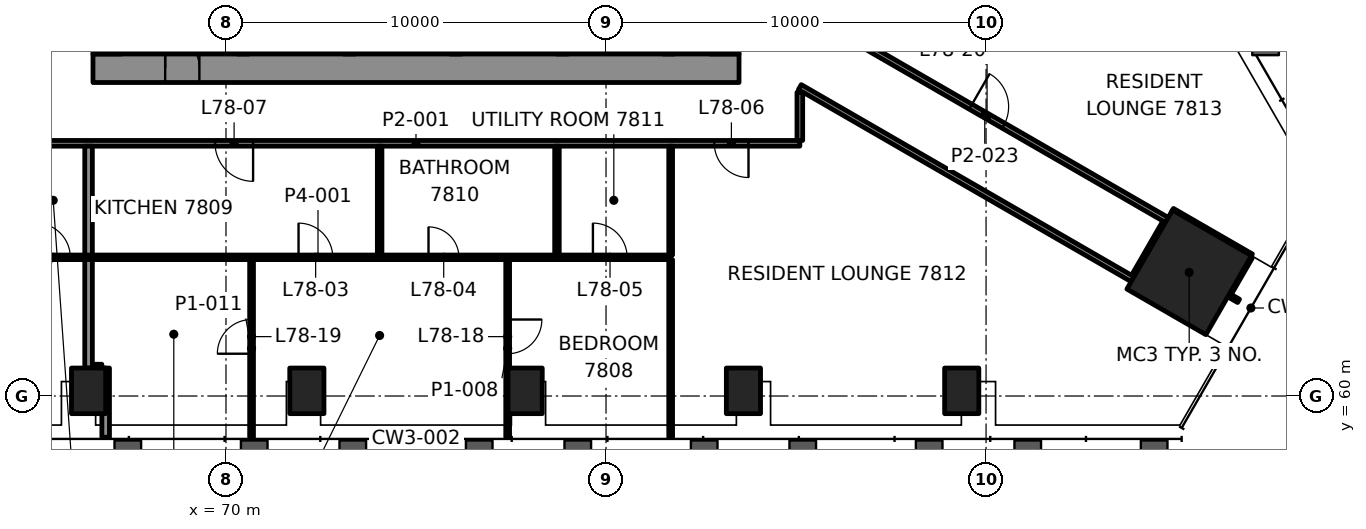
"""IFC4 building model, lengths in metres.
Left out: names, types, materials, properties, quantities, classifications, styles, units other than length and angle.
Written with IfcOpenShell. Run it as: python <this file> out.ifc"""

import sys

from ifc_helpers import new_model, si_unit, direction, frame, frame_2d, origin, origin_2d, place, context, subcontext, project, spatial, rectangle, hollow_rectangle, extrude, element, fill, save


model = new_model("IFC4")
c1 = context("Model", 3, precision=1e-05, world=origin(), true_north=direction((0.0, 1.0)))
c2 = subcontext(c1, "Body", "Model", "MODEL_VIEW")
j1 = project(units=[si_unit("LENGTHUNIT", "METRE"), si_unit("PLANEANGLEUNIT", "RADIAN")], contexts=[c1])
p1 = place(None, origin())
s1 = spatial("IfcSite", under=j1, at=p1, CompositionType="ELEMENT")
p2 = place(p1, origin())
s2 = spatial("IfcBuilding", under=s1, at=p2, CompositionType="ELEMENT")
p3 = place(p2, frame((0.0, 0.0, 319.6)))
s3 = spatial("IfcBuildingStorey", under=s2, at=p3, CompositionType="ELEMENT", Elevation=319.6)
p4 = place(p3, frame((95.345, 63.254, 0.0), z_axis=(0.0, 0.0, 1.0), x_axis=(0.5, 0.866025403784, 0.0)))
e1 = element("IfcColumn", 1, at=p4, inside=s3, PredefinedType="COLUMN", context=c2, shape_type="SweptSolid", body=[
    extrude(rectangle(XDim=2.4, YDim=2.4, at=origin_2d()), origin(), (0.0, 0.0, 1.0), 3.5),
])
for number, where, z_axis, x_axis in (
    (2, (66.384, 60.136, -0.0), (0.0, 0.0, 1.0), (1.0, 0.0, 0.0)),
    (3, (72.128, 60.136, -0.0), (0.0, 0.0, 1.0), (1.0, 0.0, 0.0)),
    (4, (77.872, 60.136, -0.0), (0.0, 0.0, 1.0), (1.0, 0.0, 0.0)),
    (5, (83.616, 60.136, -0.0), (0.0, 0.0, 1.0), (1.0, 0.0, 0.0)),
    (6, (89.36, 60.136, -0.0), (0.0, 0.0, 1.0), (1.0, 0.0, 0.0)),
):
    element("IfcColumn", number, at=place(p3, frame(where, z_axis=z_axis, x_axis=x_axis)), inside=s3, PredefinedType="COLUMN", context=c2, shape_type="SweptSolid", body=[
        extrude(hollow_rectangle(XDim=0.9, YDim=1.2, WallThickness=0.06, at=origin_2d()), origin(), (0.0, 0.0, 1.0), 3.5),
    ])
p5 = place(p3, frame((66.5, 68.625, 0.0), z_axis=(0.0, 0.0, 1.0), x_axis=(1.0, 0.0, 0.0)))
e7 = element("IfcWall", 7, at=p5, inside=s3, PredefinedType="SHEAR", context=c2, shape_type="SweptSolid", body=[
    extrude(rectangle(XDim=17.0, YDim=0.75, at=frame_2d((8.5, 0.0))), origin(), (0.0, 0.0, 1.0), 3.3),
])
p6 = place(p5, frame((1.9, 0.0, 0.0)))
e8 = element("IfcOpeningElement", 8, at=p6, cuts=e7, PredefinedType="OPENING", context=c2, shape_type="SweptSolid", body=[
    extrude(rectangle(XDim=0.9, YDim=2.1, at=frame_2d((0.45, 1.05))), frame((0.0, 0.385, 0.0), z_axis=(0.0, -1.0, 0.0), x_axis=(1.0, 0.0, 0.0)), (0.0, 0.0, 1.0), 0.77),
])
p7 = place(p3, frame((66.875, 69.0, 0.0), z_axis=(0.0, 0.0, 1.0), x_axis=(0.0, 1.0, 0.0)))
e9 = element("IfcWall", 9, at=p7, inside=s3, PredefinedType="SHEAR", context=c2, shape_type="SweptSolid", body=[
    extrude(rectangle(XDim=12.0, YDim=0.75, at=frame_2d((6.0, 0.0))), origin(), (0.0, 0.0, 1.0), 3.3),
])
p8 = place(p7, frame((3.7, 0.0, 0.0)))
e10 = element("IfcOpeningElement", 10, at=p8, cuts=e9, PredefinedType="OPENING", context=c2, shape_type="SweptSolid", body=[
    extrude(rectangle(XDim=1.2, YDim=2.1, at=frame_2d((0.6, 1.05))), frame((0.0, 0.385, 0.0), z_axis=(0.0, -1.0, 0.0), x_axis=(1.0, 0.0, 0.0)), (0.0, 0.0, 1.0), 0.77),
])
p9 = place(p3, frame((83.125, 69.0, 0.0), z_axis=(0.0, 0.0, 1.0), x_axis=(0.0, 1.0, 0.0)))
e11 = element("IfcWall", 11, at=p9, inside=s3, PredefinedType="SHEAR", context=c2, shape_type="SweptSolid", body=[
    extrude(rectangle(XDim=12.0, YDim=0.75, at=frame_2d((6.0, 0.0))), origin(), (0.0, 0.0, 1.0), 3.3),
])
p10 = place(p9, frame((3.4, 0.0, 0.0)))
e12 = element("IfcOpeningElement", 12, at=p10, cuts=e11, PredefinedType="OPENING", context=c2, shape_type="SweptSolid", body=[
    extrude(rectangle(XDim=1.8, YDim=2.1, at=frame_2d((0.9, 1.05))), frame((0.0, 0.385, 0.0), z_axis=(0.0, -1.0, 0.0), x_axis=(1.0, 0.0, 0.0)), (0.0, 0.0, 1.0), 0.77),
])
for number, where, z_axis, x_axis in (
    (13, (70.45, 69.0, 0.0), (0.0, 0.0, 1.0), (0.0, 1.0, 0.0)),
    (14, (73.25, 69.0, 0.0), (0.0, 0.0, 1.0), (0.0, 1.0, 0.0)),
    (15, (76.05, 69.0, 0.0), (0.0, 0.0, 1.0), (0.0, 1.0, 0.0)),
    (16, (78.85, 69.0, 0.0), (0.0, 0.0, 1.0), (0.0, 1.0, 0.0)),
    (17, (81.65, 69.0, 0.0), (0.0, 0.0, 1.0), (0.0, 1.0, 0.0)),
):
    element("IfcWall", number, at=place(p3, frame(where, z_axis=z_axis, x_axis=x_axis)), inside=s3, PredefinedType="SHEAR", context=c2, shape_type="SweptSolid", body=[
        extrude(rectangle(XDim=2.6, YDim=0.3, at=frame_2d((1.3, 0.0))), origin(), (0.0, 0.0, 1.0), 3.3),
    ])
p11 = place(p3, frame((66.484, 60.736, 0.0), z_axis=(0.0, 0.0, 1.0), x_axis=(1.0, 0.0, 0.0)))
e18 = element("IfcWall", 18, at=p11, inside=s3, PredefinedType="PARTITIONING", context=c2, shape_type="SweptSolid", body=[
    extrude(rectangle(XDim=0.25, YDim=0.2, at=frame_2d((0.125, 0.0))), origin(), (0.0, 0.0, 1.0), 2.7),
])
p12 = place(p3, frame((63.141, 63.65, 0.0), z_axis=(0.0, 0.0, 1.0), x_axis=(1.0, 0.0, 0.0)))
e19 = element("IfcWall", 19, at=p12, inside=s3, PredefinedType="PARTITIONING", context=c2, shape_type="SweptSolid", body=[
    extrude(rectangle(XDim=18.56, YDim=0.12, at=frame_2d((9.28, 0.0))), origin(), (0.0, 0.0, 1.0), 2.7),
])
p13 = place(p12, frame((0.391, 0.0, 0.0)))
e20 = element("IfcOpeningElement", 20, at=p13, cuts=e19, PredefinedType="OPENING", context=c2, shape_type="SweptSolid", body=[
    extrude(rectangle(XDim=0.8, YDim=2.1, at=frame_2d((0.4, 1.05))), frame((0.0, 0.07, 0.0), z_axis=(0.0, -1.0, 0.0), x_axis=(1.0, 0.0, 0.0)), (0.0, 0.0, 1.0), 0.14),
])
p14 = place(p12, frame((1.862, 0.0, 0.0)))
e21 = element("IfcOpeningElement", 21, at=p14, cuts=e19, PredefinedType="OPENING", context=c2, shape_type="SweptSolid", body=[
    extrude(rectangle(XDim=0.9, YDim=2.1, at=frame_2d((0.45, 1.05))), frame((0.0, 0.07, 0.0), z_axis=(0.0, -1.0, 0.0), x_axis=(1.0, 0.0, 0.0)), (0.0, 0.0, 1.0), 0.14),
])
p15 = place(p12, frame((8.768, 0.0, 0.0)))
e22 = element("IfcOpeningElement", 22, at=p15, cuts=e19, PredefinedType="OPENING", context=c2, shape_type="SweptSolid", body=[
    extrude(rectangle(XDim=0.9, YDim=2.1, at=frame_2d((0.45, 1.05))), frame((0.0, 0.07, 0.0), z_axis=(0.0, -1.0, 0.0), x_axis=(1.0, 0.0, 0.0)), (0.0, 0.0, 1.0), 0.14),
])
p16 = place(p12, frame((12.188, 0.0, 0.0)))
e23 = element("IfcOpeningElement", 23, at=p16, cuts=e19, PredefinedType="OPENING", context=c2, shape_type="SweptSolid", body=[
    extrude(rectangle(XDim=0.8, YDim=2.1, at=frame_2d((0.4, 1.05))), frame((0.0, 0.07, 0.0), z_axis=(0.0, -1.0, 0.0), x_axis=(1.0, 0.0, 0.0)), (0.0, 0.0, 1.0), 0.14),
])
p17 = place(p12, frame((16.514, 0.0, 0.0)))
e24 = element("IfcOpeningElement", 24, at=p17, cuts=e19, PredefinedType="OPENING", context=c2, shape_type="SweptSolid", body=[
    extrude(rectangle(XDim=0.9, YDim=2.1, at=frame_2d((0.45, 1.05))), frame((0.0, 0.07, 0.0), z_axis=(0.0, -1.0, 0.0), x_axis=(1.0, 0.0, 0.0)), (0.0, 0.0, 1.0), 0.14),
])
p18 = place(p3, frame((85.099, 66.65, 0.0), z_axis=(0.0, 0.0, 1.0), x_axis=(-1.0, 0.0, 0.0)))
e25 = element("IfcWall", 25, at=p18, inside=s3, PredefinedType="PARTITIONING", context=c2, shape_type="SweptSolid", body=[
    extrude(rectangle(XDim=20.199, YDim=0.15, at=frame_2d((10.1, 0.0))), origin(), (0.0, 0.0, 1.0), 2.7),
])
p19 = place(p18, frame((1.351, 0.0, 0.0)))
e26 = element("IfcOpeningElement", 26, at=p19, cuts=e25, PredefinedType="OPENING", context=c2, shape_type="SweptSolid", body=[
    extrude(rectangle(XDim=0.9, YDim=2.1, at=frame_2d((0.45, 1.05))), frame((0.0, 0.085, 0.0), z_axis=(0.0, -1.0, 0.0), x_axis=(1.0, 0.0, 0.0)), (0.0, 0.0, 1.0), 0.17),
])
p20 = place(p18, frame((14.386, 0.0, 0.0)))
e27 = element("IfcOpeningElement", 27, at=p20, cuts=e25, PredefinedType="OPENING", context=c2, shape_type="SweptSolid", body=[
    extrude(rectangle(XDim=1.0, YDim=2.1, at=frame_2d((0.5, 1.05))), frame((0.0, 0.085, 0.0), z_axis=(0.0, -1.0, 0.0), x_axis=(1.0, 0.0, 0.0)), (0.0, 0.0, 1.0), 0.17),
])
p21 = place(p3, frame((96.384, 62.654, 0.0), z_axis=(0.0, 0.0, 1.0), x_axis=(0.500022773673, 0.866012254999, 0.0)))
e28 = element("IfcWall", 28, at=p21, inside=s3, PredefinedType="PARTITIONING", context=c2, shape_type="SweptSolid", body=[
    extrude(rectangle(XDim=1.149, YDim=0.1, at=frame_2d((0.575, 0.0))), origin(), (0.0, 0.0, 1.0), 2.7),
])
p22 = place(p3, frame((93.893, 63.14, 0.0), z_axis=(0.0, 0.0, 1.0), x_axis=(0.499988108725, 0.866032269107, 0.0)))
e29 = element("IfcWall", 29, at=p22, inside=s3, PredefinedType="PARTITIONING", context=c2, shape_type="SweptSolid", body=[
    extrude(rectangle(XDim=1.644, YDim=0.15, at=frame_2d((0.822, 0.0))), origin(), (0.0, 0.0, 1.0), 2.697),
])
p23 = place(p3, frame((85.1, 66.726, 0.0), z_axis=(0.0, 0.0, 1.0), x_axis=(0.0, 1.0, 0.0)))
e30 = element("IfcWall", 30, at=p23, inside=s3, PredefinedType="PARTITIONING", context=c2, shape_type="SweptSolid", body=[
    extrude(rectangle(XDim=1.267, YDim=0.15, at=frame_2d((0.634, 0.0))), origin(), (0.0, 0.0, 1.0), 2.697),
])
p24 = place(p3, frame((81.701, 58.916, 0.0), z_axis=(0.0, 0.0, 1.0), x_axis=(0.0, 1.0, 0.0)))
e31 = element("IfcWall", 31, at=p24, inside=s3, PredefinedType="PARTITIONING", context=c2, shape_type="SweptSolid", body=[
    extrude(rectangle(XDim=4.674, YDim=0.1, at=frame_2d((2.337, 0.0))), origin(), (0.0, 0.0, 1.0), 2.688),
])
p25 = place(p3, frame((78.709, 63.71, 0.0), z_axis=(0.0, 0.0, 1.0), x_axis=(0.0, 1.0, 0.0)))
e32 = element("IfcWall", 32, at=p25, inside=s3, PredefinedType="PARTITIONING", context=c2, shape_type="SweptSolid", body=[
    extrude(rectangle(XDim=2.865, YDim=0.12, at=frame_2d((1.433, 0.0))), origin(), (0.0, 0.0, 1.0), 2.7),
])
p26 = place(p3, frame((77.412, 63.59, 0.0), z_axis=(0.0, 0.0, 1.0), x_axis=(0.0, -1.0, 0.0)))
e33 = element("IfcWall", 33, at=p26, inside=s3, PredefinedType="PARTITIONING", context=c2, shape_type="SweptSolid", body=[
    extrude(rectangle(XDim=4.674, YDim=0.1, at=frame_2d((2.337, 0.0))), origin(), (0.0, 0.0, 1.0), 2.688),
])
p27 = place(p26, frame((1.577, 0.0, 0.0)))
e34 = element("IfcOpeningElement", 34, at=p27, cuts=e33, PredefinedType="OPENING", context=c2, shape_type="SweptSolid", body=[
    extrude(rectangle(XDim=0.9, YDim=2.1, at=frame_2d((0.45, 1.05))), frame((0.0, 0.06, 0.0), z_axis=(0.0, -1.0, 0.0), x_axis=(1.0, 0.0, 0.0)), (0.0, 0.0, 1.0), 0.12),
])
p28 = place(p3, frame((74.043, 63.71, 0.0), z_axis=(0.0, 0.0, 1.0), x_axis=(0.0, 1.0, 0.0)))
e35 = element("IfcWall", 35, at=p28, inside=s3, PredefinedType="PARTITIONING", context=c2, shape_type="SweptSolid", body=[
    extrude(rectangle(XDim=2.865, YDim=0.12, at=frame_2d((1.433, 0.0))), origin(), (0.0, 0.0, 1.0), 2.7),
])
p29 = place(p3, frame((70.673, 58.916, 0.0), z_axis=(0.0, 0.0, 1.0), x_axis=(0.0, 1.0, 0.0)))
e36 = element("IfcWall", 36, at=p29, inside=s3, PredefinedType="PARTITIONING", context=c2, shape_type="SweptSolid", body=[
    extrude(rectangle(XDim=4.674, YDim=0.1, at=frame_2d((2.337, 0.0))), origin(), (0.0, 0.0, 1.0), 2.688),
])
p30 = place(p29, frame((2.197, 0.0, 0.0)))
e37 = element("IfcOpeningElement", 37, at=p30, cuts=e36, PredefinedType="OPENING", context=c2, shape_type="SweptSolid", body=[
    extrude(rectangle(XDim=0.9, YDim=2.1, at=frame_2d((0.45, 1.05))), frame((0.0, 0.06, 0.0), z_axis=(0.0, -1.0, 0.0), x_axis=(1.0, 0.0, 0.0)), (0.0, 0.0, 1.0), 0.12),
])
p31 = place(p3, frame((66.834, 58.916, 0.0), z_axis=(0.0, 0.0, 1.0), x_axis=(0.0, 1.0, 0.0)))
e38 = element("IfcWall", 38, at=p31, inside=s3, PredefinedType="PARTITIONING", context=c2, shape_type="SweptSolid", body=[
    extrude(rectangle(XDim=1.82, YDim=0.2, at=frame_2d((0.91, 0.0))), origin(), (0.0, 0.0, 1.0), 2.688),
])
p32 = place(p3, frame((66.384, 60.736, 0.0), z_axis=(0.0, 0.0, 1.0), x_axis=(0.0, 1.0, 0.0)))
e39 = element("IfcWall", 39, at=p32, inside=s3, PredefinedType="PARTITIONING", context=c2, shape_type="SweptSolid", body=[
    extrude(rectangle(XDim=2.854, YDim=0.2, at=frame_2d((1.427, 0.0))), origin(), (0.0, 0.0, 1.0), 2.7),
])
p33 = place(p3, frame((96.984, 63.693, 0.0), z_axis=(0.0, 0.0, 1.0), x_axis=(-0.866011011868, 0.500024926702, 0.0)))
e40 = element("IfcWall", 40, at=p33, inside=s3, PredefinedType="PARTITIONING", context=c2, shape_type="SweptSolid", body=[
    extrude(rectangle(XDim=2.399, YDim=0.1, at=frame_2d((1.199, 0.0))), origin(), (0.0, 0.0, 1.0), 2.7),
])
p34 = place(p3, frame((85.175, 70.165, 0.0), z_axis=(0.0, 0.0, 1.0), x_axis=(0.866024989193, -0.500000718093, 0.0)))
e41 = element("IfcWall", 41, at=p34, inside=s3, PredefinedType="PARTITIONING", context=c2, shape_type="SweptSolid", body=[
    extrude(rectangle(XDim=11.063, YDim=0.15, at=frame_2d((5.531, 0.0))), origin(), (0.0, 0.0, 1.0), 2.7),
])
p35 = place(p34, frame((5.102, 0.0, 0.0)))
e42 = element("IfcOpeningElement", 42, at=p35, cuts=e41, PredefinedType="OPENING", context=c2, shape_type="SweptSolid", body=[
    extrude(rectangle(XDim=1.0, YDim=2.1, at=frame_2d((0.5, 1.05))), frame((0.0, 0.085, 0.0), z_axis=(0.0, -1.0, 0.0), x_axis=(1.0, 0.0, 0.0)), (0.0, 0.0, 1.0), 0.17),
])
p36 = place(p3, frame((96.644, 62.504, 0.0), z_axis=(0.0, 0.0, 1.0), x_axis=(-0.866071776036, 0.499919672301, 0.0)))
e43 = element("IfcWall", 43, at=p36, inside=s3, PredefinedType="PARTITIONING", context=c2, shape_type="SweptSolid", body=[
    extrude(rectangle(XDim=0.25, YDim=0.1, at=frame_2d((0.125, 0.0))), origin(), (0.0, 0.0, 1.0), 2.7),
])
p37 = place(p3, frame((93.855, 63.075, 0.0), z_axis=(0.0, 0.0, 1.0), x_axis=(-0.866024727794, 0.500001170848, 0.0)))
e44 = element("IfcWall", 44, at=p37, inside=s3, PredefinedType="PARTITIONING", context=c2, shape_type="SweptSolid", body=[
    extrude(rectangle(XDim=10.11, YDim=0.15, at=frame_2d((5.055, 0.0))), origin(), (0.0, 0.0, 1.0), 2.697),
])
p38 = place(p3, frame((81.701, 63.71, 0.0), z_axis=(0.0, 0.0, 1.0), x_axis=(0.0, 1.0, 0.0)))
e45 = element("IfcWall", 45, at=p38, inside=s3, PredefinedType="PARTITIONING", context=c2, shape_type="SweptSolid", body=[
    extrude(rectangle(XDim=2.865, YDim=0.1, at=frame_2d((1.433, 0.0))), origin(), (0.0, 0.0, 1.0), 2.7),
])
p39 = place(p3, frame((66.384, 63.71, 0.0), z_axis=(0.0, 0.0, 1.0), x_axis=(0.0, 1.0, 0.0)))
e46 = element("IfcWall", 46, at=p39, inside=s3, PredefinedType="PARTITIONING", context=c2, shape_type="SweptSolid", body=[
    extrude(rectangle(XDim=2.865, YDim=0.2, at=frame_2d((1.433, 0.0))), origin(), (0.0, 0.0, 1.0), 2.7),
])
p40 = place(p14, origin())
e47 = element("IfcDoor", 47, at=p40, inside=s3, OperationType="SINGLE_SWING_LEFT", PredefinedType="DOOR", context=c2, shape_type="SweptSolid", body=[
    extrude(rectangle(XDim=0.9, YDim=2.1, at=frame_2d((0.45, 1.05))), frame((0.0, 0.025, 0.0), z_axis=(0.0, -1.0, 0.0), x_axis=(1.0, 0.0, 0.0)), (0.0, 0.0, 1.0), 0.05),
])
fill(e21, e47)
p41 = place(p15, origin())
e48 = element("IfcDoor", 48, at=p41, inside=s3, OperationType="SINGLE_SWING_RIGHT", PredefinedType="DOOR", context=c2, shape_type="SweptSolid", body=[
    extrude(rectangle(XDim=0.9, YDim=2.1, at=frame_2d((0.45, 1.05))), frame((0.0, 0.025, 0.0), z_axis=(0.0, -1.0, 0.0), x_axis=(1.0, 0.0, 0.0)), (0.0, 0.0, 1.0), 0.05),
])
fill(e22, e48)
p42 = place(p16, origin())
e49 = element("IfcDoor", 49, at=p42, inside=s3, OperationType="SINGLE_SWING_LEFT", PredefinedType="DOOR", context=c2, shape_type="SweptSolid", body=[
    extrude(rectangle(XDim=0.8, YDim=2.1, at=frame_2d((0.4, 1.05))), frame((0.0, 0.025, 0.0), z_axis=(0.0, -1.0, 0.0), x_axis=(1.0, 0.0, 0.0)), (0.0, 0.0, 1.0), 0.05),
])
fill(e23, e49)
p43 = place(p17, origin())
e50 = element("IfcDoor", 50, at=p43, inside=s3, OperationType="SINGLE_SWING_RIGHT", PredefinedType="DOOR", context=c2, shape_type="SweptSolid", body=[
    extrude(rectangle(XDim=0.9, YDim=2.1, at=frame_2d((0.45, 1.05))), frame((0.0, 0.025, 0.0), z_axis=(0.0, -1.0, 0.0), x_axis=(1.0, 0.0, 0.0)), (0.0, 0.0, 1.0), 0.05),
])
fill(e24, e50)
p44 = place(p19, origin())
e51 = element("IfcDoor", 51, at=p44, inside=s3, OperationType="SINGLE_SWING_RIGHT", PredefinedType="DOOR", context=c2, shape_type="SweptSolid", body=[
    extrude(rectangle(XDim=0.9, YDim=2.1, at=frame_2d((0.45, 1.05))), frame((0.0, 0.025, 0.0), z_axis=(0.0, -1.0, 0.0), x_axis=(1.0, 0.0, 0.0)), (0.0, 0.0, 1.0), 0.05),
])
fill(e26, e51)
p45 = place(p20, origin())
e52 = element("IfcDoor", 52, at=p45, inside=s3, OperationType="SINGLE_SWING_RIGHT", PredefinedType="DOOR", context=c2, shape_type="SweptSolid", body=[
    extrude(rectangle(XDim=1.0, YDim=2.1, at=frame_2d((0.5, 1.05))), frame((0.0, 0.025, 0.0), z_axis=(0.0, -1.0, 0.0), x_axis=(1.0, 0.0, 0.0)), (0.0, 0.0, 1.0), 0.05),
])
fill(e27, e52)
p46 = place(p27, origin())
e53 = element("IfcDoor", 53, at=p46, inside=s3, OperationType="SINGLE_SWING_LEFT", PredefinedType="DOOR", context=c2, shape_type="SweptSolid", body=[
    extrude(rectangle(XDim=0.9, YDim=2.1, at=frame_2d((0.45, 1.05))), frame((0.0, 0.025, 0.0), z_axis=(0.0, -1.0, 0.0), x_axis=(1.0, 0.0, 0.0)), (0.0, 0.0, 1.0), 0.05),
])
fill(e34, e53)
p47 = place(p30, origin())
e54 = element("IfcDoor", 54, at=p47, inside=s3, OperationType="SINGLE_SWING_LEFT", PredefinedType="DOOR", context=c2, shape_type="SweptSolid", body=[
    extrude(rectangle(XDim=0.9, YDim=2.1, at=frame_2d((0.45, 1.05))), frame((0.0, 0.025, 0.0), z_axis=(0.0, -1.0, 0.0), x_axis=(1.0, 0.0, 0.0)), (0.0, 0.0, 1.0), 0.05),
])
fill(e37, e54)
p48 = place(p35, origin())
e55 = element("IfcDoor", 55, at=p48, inside=s3, OperationType="SINGLE_SWING_LEFT", PredefinedType="DOOR", context=c2, shape_type="SweptSolid", body=[
    extrude(rectangle(XDim=1.0, YDim=2.1, at=frame_2d((0.5, 1.05))), frame((0.0, 0.025, 0.0), z_axis=(0.0, -1.0, 0.0), x_axis=(1.0, 0.0, 0.0)), (0.0, 0.0, 1.0), 0.05),
])
fill(e42, e55)
p49 = place(p6, origin())
e56 = element("IfcDoor", 56, at=p49, inside=s3, OperationType="SINGLE_SWING_RIGHT", PredefinedType="DOOR", context=c2, shape_type="SweptSolid", body=[
    extrude(rectangle(XDim=0.9, YDim=2.1, at=frame_2d((0.45, 1.05))), frame((0.0, 0.095, 0.0), z_axis=(0.0, -1.0, 0.0), x_axis=(1.0, 0.0, 0.0)), (0.0, 0.0, 1.0), 0.19),
])
fill(e8, e56)
save(model, sys.argv[1])
